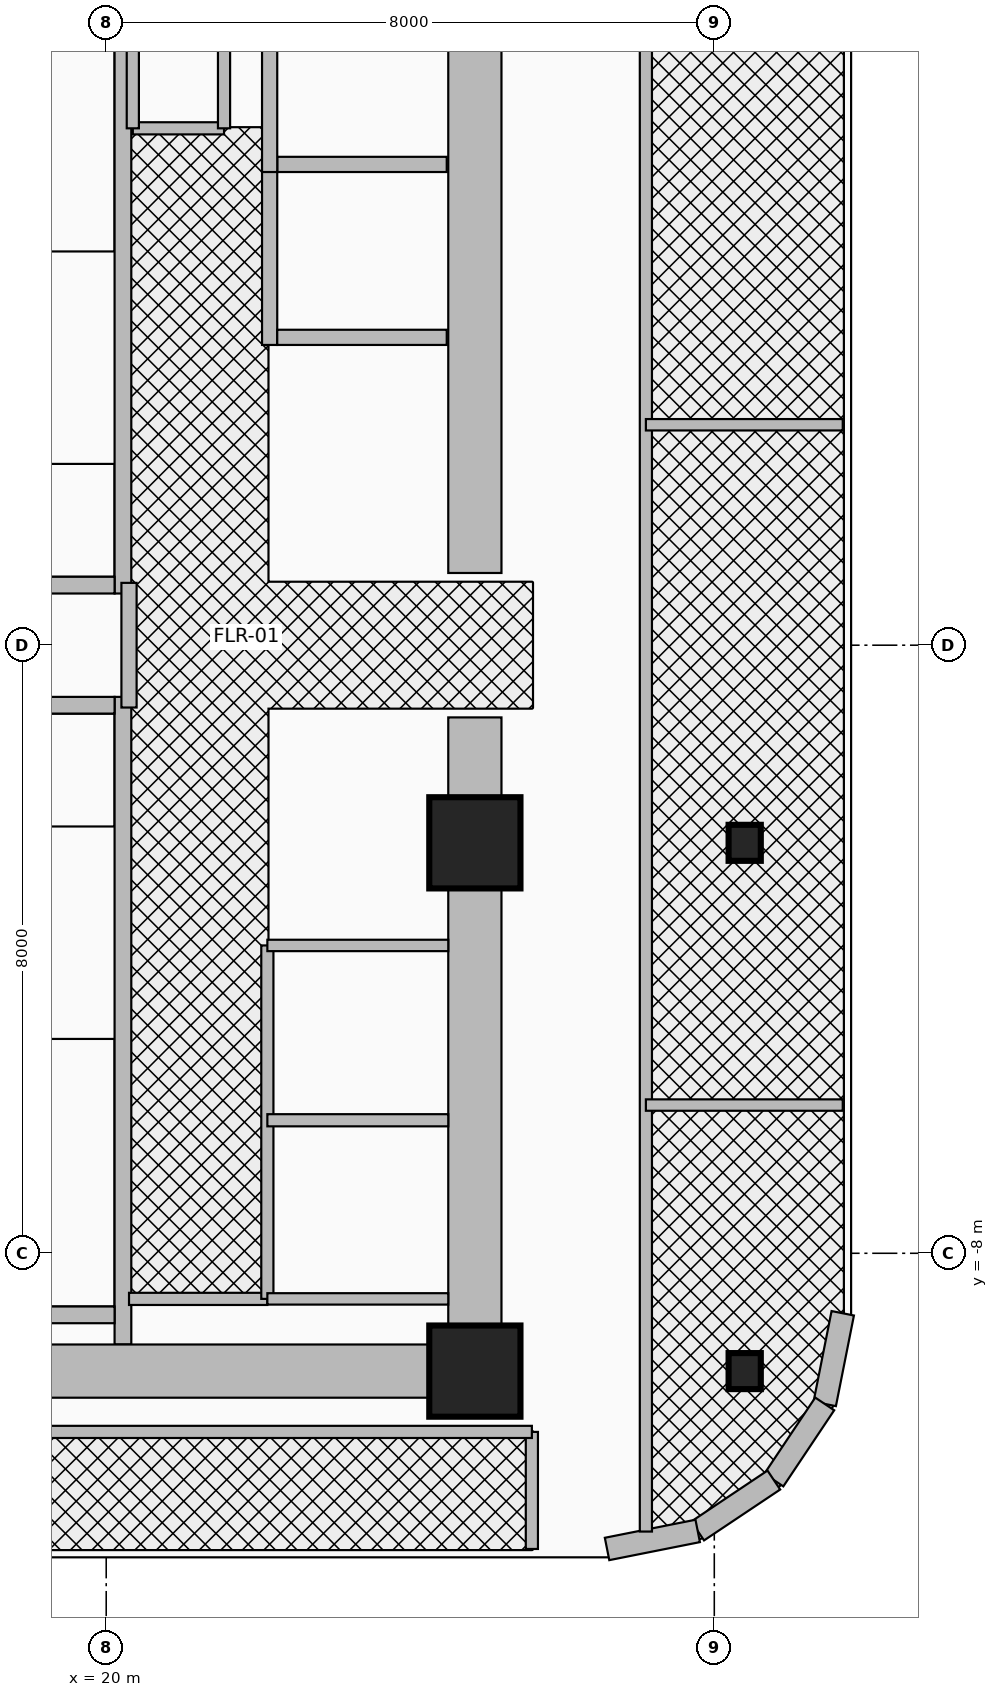
"""IFC4 building model, lengths in metres.
Left out: names, types, materials, properties, quantities, classifications, styles, units other than length and angle.
Written with IfcOpenShell. Run it as: python <this file> out.ifc"""

import sys

from ifc_helpers import new_model, si_unit, direction, frame, frame_2d, origin, origin_2d, place, context, subcontext, project, spatial, rectangle, i_section, extrude, source, transform, mapped, element, fill, save


model = new_model("IFC4")
c1 = context("Model", 3, precision=1e-05, world=origin(), true_north=direction((0.0, 1.0)))
c2 = subcontext(c1, "Body", "Model", "MODEL_VIEW")
j1 = project(units=[si_unit("LENGTHUNIT", "METRE"), si_unit("PLANEANGLEUNIT", "RADIAN")], contexts=[c1])
p1 = place(None, origin())
s1 = spatial("IfcSite", under=j1, at=p1, CompositionType="ELEMENT")
p2 = place(p1, origin())
s2 = spatial("IfcBuilding", under=s1, at=p2, CompositionType="ELEMENT")
p3 = place(p2, frame((0.0, 0.0, 131.6)))
s3 = spatial("IfcBuildingStorey", under=s2, at=p3, CompositionType="ELEMENT", Elevation=131.6)
p4 = place(p3, frame((20.22, 0.68, 0.0), z_axis=(0.0, 0.0, 1.0), x_axis=(0.0, 1.0, 0.0)))
e1 = element("IfcWall", 1, at=p4, inside=s3, PredefinedType="SHEAR", context=c2, shape_type="SweptSolid", body=[
    extrude(rectangle(XDim=8.52, YDim=0.22, at=frame_2d((4.26, 0.0))), origin(), (0.0, 0.0, 1.0), 3.46),
])
p5 = place(p3, frame((17.0, 0.79, 0.0), z_axis=(0.0, 0.0, 1.0), x_axis=(1.0, 0.0, 0.0)))
e2 = element("IfcWall", 2, at=p5, inside=s3, PredefinedType="SHEAR", context=c2, shape_type="SweptSolid", body=[
    extrude(rectangle(XDim=3.11, YDim=0.22, at=frame_2d((1.555, 0.0))), origin(), (0.0, 0.0, 1.0), 3.46),
])
p6 = place(p5, frame((0.95, 0.0, 0.0)))
e3 = element("IfcOpeningElement", 3, at=p6, cuts=e2, PredefinedType="OPENING", context=c2, shape_type="SweptSolid", body=[
    extrude(rectangle(XDim=1.1, YDim=2.15, at=frame_2d((0.55, 1.075))), frame((0.0, 0.125, 0.0), z_axis=(0.0, -1.0, 0.0), x_axis=(1.0, 0.0, 0.0)), (0.0, 0.0, 1.0), 0.25),
])
p7 = place(p3, frame((20.22, -9.2, 0.0), z_axis=(0.0, 0.0, 1.0), x_axis=(0.0, 1.0, 0.0)))
e4 = element("IfcWall", 4, at=p7, inside=s3, PredefinedType="SHEAR", context=c2, shape_type="SweptSolid", body=[
    extrude(rectangle(XDim=8.52, YDim=0.22, at=frame_2d((4.26, 0.0))), origin(), (0.0, 0.0, 1.0), 3.46),
])
p8 = place(p3, frame((17.0, -8.81, 0.0), z_axis=(0.0, 0.0, 1.0), x_axis=(1.0, 0.0, 0.0)))
e5 = element("IfcWall", 5, at=p8, inside=s3, PredefinedType="SHEAR", context=c2, shape_type="SweptSolid", body=[
    extrude(rectangle(XDim=3.11, YDim=0.22, at=frame_2d((1.555, 0.0))), origin(), (0.0, 0.0, 1.0), 3.46),
])
p9 = place(p3, frame((17.0, -0.79, 0.0), z_axis=(0.0, 0.0, 1.0), x_axis=(1.0, 0.0, 0.0)))
e6 = element("IfcWall", 6, at=p9, inside=s3, PredefinedType="SHEAR", context=c2, shape_type="SweptSolid", body=[
    extrude(rectangle(XDim=3.11, YDim=0.22, at=frame_2d((1.555, 0.0))), origin(), (0.0, 0.0, 1.0), 3.46),
])
p10 = place(p9, frame((0.95, 0.0, 0.0)))
e7 = element("IfcOpeningElement", 7, at=p10, cuts=e6, PredefinedType="OPENING", context=c2, shape_type="SweptSolid", body=[
    extrude(rectangle(XDim=1.1, YDim=2.15, at=frame_2d((0.55, 1.075))), frame((0.0, 0.125, 0.0), z_axis=(0.0, -1.0, 0.0), x_axis=(1.0, 0.0, 0.0)), (0.0, 0.0, 1.0), 0.25),
])
for number, where, z_axis, x_axis in (
    (8, (24.85, -9.9, 0.0), (0.0, 0.0, 1.0), (0.0, 1.0, 0.0)),
    (9, (24.85, 0.95, 0.0), (0.0, 0.0, 1.0), (0.0, 1.0, 0.0)),
):
    element("IfcWall", number, at=place(p3, frame(where, z_axis=z_axis, x_axis=x_axis)), inside=s3, PredefinedType="SHEAR", context=c2, shape_type="SweptSolid", body=[
        extrude(rectangle(XDim=8.95, YDim=0.7, at=frame_2d((4.475, 0.0))), origin(), (0.0, 0.0, 1.0), 3.46),
    ])
p11 = place(p3, frame((15.85, -9.55, 0.0), z_axis=(0.0, 0.0, 1.0), x_axis=(1.0, 0.0, 0.0)))
e10 = element("IfcWall", 10, at=p11, inside=s3, PredefinedType="SHEAR", context=c2, shape_type="SweptSolid", body=[
    extrude(rectangle(XDim=9.0, YDim=0.7, at=frame_2d((4.5, 0.0))), origin(), (0.0, 0.0, 1.0), 3.46),
])
m1 = source(origin(), c2, "Body", "SweptSolid", [
    extrude(rectangle(XDim=1.2, YDim=1.2, at=origin_2d()), origin(), (0.0, 0.0, 1.0), 3.7),
])
p12 = place(p3, frame((24.85, -9.55, 0.0), z_axis=(0.0, 0.0, 1.0), x_axis=(1.0, 0.0, 0.0)))
e11 = element("IfcColumn", 11, at=p12, inside=s3, PredefinedType="COLUMN", context=c2, shape_type="MappedRepresentation", body=[
    mapped(m1, transform((0.0, 0.0, 0.0), x_axis=(1.0, 0.0, 0.0), y_axis=(0.0, 1.0, 0.0), z_axis=(0.0, 0.0, 1.0), scale=1.0)),
])
m2 = source(origin(), c2, "Body", "SweptSolid", [
    extrude(i_section(OverallWidth=0.424, OverallDepth=0.474, WebThickness=0.048, FlangeThickness=0.077, at=origin_2d()), origin(), (0.0, 0.0, 1.0), 3.7),
])
p13 = place(p3, frame((28.4, -9.55, 0.0), z_axis=(0.0, 0.0, 1.0), x_axis=(1.0, 0.0, 0.0)))
e12 = element("IfcColumn", 12, at=p13, inside=s3, PredefinedType="COLUMN", context=c2, shape_type="MappedRepresentation", body=[
    mapped(m2, transform((0.0, 0.0, 0.0), x_axis=(1.0, 0.0, 0.0), y_axis=(0.0, 1.0, 0.0), z_axis=(0.0, 0.0, 1.0), scale=1.0)),
])
p14 = place(p3, frame((24.85, -2.6, 0.0), z_axis=(0.0, 0.0, 1.0), x_axis=(1.0, 0.0, 0.0)))
e13 = element("IfcColumn", 13, at=p14, inside=s3, PredefinedType="COLUMN", context=c2, shape_type="MappedRepresentation", body=[
    mapped(m1, transform((0.0, 0.0, 0.0), x_axis=(1.0, 0.0, 0.0), y_axis=(0.0, 1.0, 0.0), z_axis=(0.0, 0.0, 1.0), scale=1.0)),
])
p15 = place(p3, frame((28.4, -2.6, 0.0), z_axis=(0.0, 0.0, 1.0), x_axis=(1.0, 0.0, 0.0)))
e14 = element("IfcColumn", 14, at=p15, inside=s3, PredefinedType="COLUMN", context=c2, shape_type="MappedRepresentation", body=[
    mapped(m2, transform((0.0, 0.0, 0.0), x_axis=(1.0, 0.0, 0.0), y_axis=(0.0, 1.0, 0.0), z_axis=(0.0, 0.0, 1.0), scale=1.0)),
])
p16 = place(p3, frame((29.69, -8.789, 0.0), z_axis=(0.0, 0.0, 1.0), x_axis=(-0.194996050505, -0.980804027463, 0.0)))
e15 = element("IfcWall", 15, at=p16, inside=s3, PredefinedType="SOLIDWALL", context=c2, shape_type="SweptSolid", body=[
    extrude(rectangle(XDim=1.216, YDim=0.3, at=frame_2d((0.608, 0.0))), origin(), (0.0, 0.0, 1.0), 3.46),
])
for number, where, z_axis, x_axis in (
    (16, (29.453, -9.982, 0.0), (0.0, 0.0, 1.0), (-0.556, -0.831, 0.0)),
    (17, (28.783, -10.983, 0.0), (0.0, 0.0, 1.0), (-0.831, -0.556, 0.0)),
):
    element("IfcWall", number, at=place(p3, frame(where, z_axis=z_axis, x_axis=x_axis)), inside=s3, PredefinedType="SOLIDWALL", context=c2, shape_type="SweptSolid", body=[
        extrude(rectangle(XDim=1.205, YDim=0.3, at=frame_2d((0.603, 0.0))), origin(), (0.0, 0.0, 1.0), 3.46),
    ])
p17 = place(p3, frame((27.782, -11.653, 0.0), z_axis=(0.0, 0.0, 1.0), x_axis=(-0.980811661072, -0.194957650543, 0.0)))
e18 = element("IfcWall", 18, at=p17, inside=s3, PredefinedType="SOLIDWALL", context=c2, shape_type="SweptSolid", body=[
    extrude(rectangle(XDim=1.216, YDim=0.3, at=frame_2d((0.608, 0.0))), origin(), (0.0, 0.0, 1.0), 3.46),
])
p18 = place(p3, frame((22.15, 3.95, 0.0), z_axis=(0.0, 0.0, 1.0), x_axis=(0.0, 1.0, 0.0)))
e19 = element("IfcWall", 19, at=p18, inside=s3, PredefinedType="MOVABLE", context=c2, shape_type="SweptSolid", body=[
    extrude(rectangle(XDim=2.475, YDim=0.2, at=frame_2d((1.238, 0.0))), origin(), (0.0, 0.0, 1.0), 3.46),
])
p19 = place(p18, frame((0.688, 0.0, 0.0)))
e20 = element("IfcOpeningElement", 20, at=p19, cuts=e19, PredefinedType="OPENING", context=c2, shape_type="SweptSolid", body=[
    extrude(rectangle(XDim=1.1, YDim=2.1, at=frame_2d((0.55, 1.05))), frame((0.0, 0.115, 0.0), z_axis=(0.0, -1.0, 0.0), x_axis=(1.0, 0.0, 0.0)), (0.0, 0.0, 1.0), 0.23),
])
for number, where, z_axis, x_axis in (
    (21, (22.25, 4.05, 0.0), (0.0, 0.0, 1.0), (1.0, 0.0, 0.0)),
    (22, (22.25, 6.325, 0.0), (0.0, 0.0, 1.0), (1.0, 0.0, 0.0)),
):
    element("IfcWall", number, at=place(p3, frame(where, z_axis=z_axis, x_axis=x_axis)), inside=s3, PredefinedType="MOVABLE", context=c2, shape_type="SweptSolid", body=[
        extrude(rectangle(XDim=2.23, YDim=0.2, at=frame_2d((1.115, 0.0))), origin(), (0.0, 0.0, 1.0), 2.245),
    ])
p20 = place(p3, frame((22.15, 6.225, 0.0), z_axis=(0.0, 0.0, 1.0), x_axis=(0.0, 1.0, 0.0)))
e23 = element("IfcWall", 23, at=p20, inside=s3, PredefinedType="MOVABLE", context=c2, shape_type="SweptSolid", body=[
    extrude(rectangle(XDim=2.475, YDim=0.2, at=frame_2d((1.237, 0.0))), origin(), (0.0, 0.0, 1.0), 3.46),
])
p21 = place(p20, frame((0.688, 0.0, 0.0)))
e24 = element("IfcOpeningElement", 24, at=p21, cuts=e23, PredefinedType="OPENING", context=c2, shape_type="SweptSolid", body=[
    extrude(rectangle(XDim=1.1, YDim=2.1, at=frame_2d((0.55, 1.05))), frame((0.0, 0.115, 0.0), z_axis=(0.0, -1.0, 0.0), x_axis=(1.0, 0.0, 0.0)), (0.0, 0.0, 1.0), 0.23),
])
p22 = place(p3, frame((20.3, -0.82, 0.0), z_axis=(0.0, 0.0, 1.0), x_axis=(0.0, 1.0, 0.0)))
e25 = element("IfcWall", 25, at=p22, inside=s3, PredefinedType="PARTITIONING", context=c2, shape_type="SweptSolid", body=[
    extrude(rectangle(XDim=1.64, YDim=0.2, at=frame_2d((0.82, 0.0))), origin(), (0.0, 0.0, 1.0), 3.46),
])
p23 = place(p22, frame((0.295, 0.0, 0.0)))
e26 = element("IfcOpeningElement", 26, at=p23, cuts=e25, PredefinedType="OPENING", context=c2, shape_type="SweptSolid", body=[
    extrude(rectangle(XDim=1.05, YDim=2.15, at=frame_2d((0.525, 1.075))), frame((0.0, 0.115, 0.0), z_axis=(0.0, -1.0, 0.0), x_axis=(1.0, 0.0, 0.0)), (0.0, 0.0, 1.0), 0.23),
])
p24 = place(p3, frame((20.35, 6.8, 0.0), z_axis=(0.0, 0.0, 1.0), x_axis=(1.0, 0.0, 0.0)))
e27 = element("IfcWall", 27, at=p24, inside=s3, PredefinedType="PARTITIONING", context=c2, shape_type="SweptSolid", body=[
    extrude(rectangle(XDim=1.2, YDim=0.16, at=frame_2d((0.6, 0.0))), origin(), (0.0, 0.0, 1.0), 3.46),
])
p25 = place(p24, frame((0.175, 0.0, 0.0)))
e28 = element("IfcOpeningElement", 28, at=p25, cuts=e27, PredefinedType="OPENING", context=c2, shape_type="SweptSolid", body=[
    extrude(rectangle(XDim=0.85, YDim=2.05, at=frame_2d((0.425, 1.025))), frame((0.0, 0.095, 0.0), z_axis=(0.0, -1.0, 0.0), x_axis=(1.0, 0.0, 0.0)), (0.0, 0.0, 1.0), 0.19),
])
for number, where, z_axis, x_axis in (
    (29, (21.55, 6.8, 0.0), (0.0, 0.0, 1.0), (0.0, 1.0, 0.0)),
    (30, (20.35, 6.8, 0.0), (0.0, 0.0, 1.0), (0.0, 1.0, 0.0)),
):
    element("IfcWall", number, at=place(p3, frame(where, z_axis=z_axis, x_axis=x_axis)), inside=s3, PredefinedType="PARTITIONING", context=c2, shape_type="SweptSolid", body=[
        extrude(rectangle(XDim=1.8, YDim=0.16, at=frame_2d((0.9, 0.0))), origin(), (0.0, 0.0, 1.0), 3.46),
    ])
p26 = place(p3, frame((20.3, -8.6, 0.0), z_axis=(0.0, 0.0, 1.0), x_axis=(1.0, 0.0, 0.0)))
e31 = element("IfcWall", 31, at=p26, inside=s3, PredefinedType="PARTITIONING", context=c2, shape_type="SweptSolid", body=[
    extrude(rectangle(XDim=1.82, YDim=0.16, at=frame_2d((0.91, 0.0))), origin(), (0.0, 0.0, 1.0), 3.46),
])
p27 = place(p3, frame((22.12, -8.6, 0.0), z_axis=(0.0, 0.0, 1.0), x_axis=(0.0, 1.0, 0.0)))
e32 = element("IfcWall", 32, at=p27, inside=s3, PredefinedType="PARTITIONING", context=c2, shape_type="SweptSolid", body=[
    extrude(rectangle(XDim=4.65, YDim=0.16, at=frame_2d((2.325, 0.0))), origin(), (0.0, 0.0, 1.0), 3.46),
])
p28 = place(p27, frame((0.7, 0.0, 0.0)))
e33 = element("IfcOpeningElement", 33, at=p28, cuts=e32, PredefinedType="OPENING", context=c2, shape_type="SweptSolid", body=[
    extrude(rectangle(XDim=0.85, YDim=2.05, at=frame_2d((0.425, 1.025))), frame((0.0, 0.095, 0.0), z_axis=(0.0, -1.0, 0.0), x_axis=(1.0, 0.0, 0.0)), (0.0, 0.0, 1.0), 0.19),
])
p29 = place(p27, frame((3.0, 0.0, 0.0)))
e34 = element("IfcOpeningElement", 34, at=p29, cuts=e32, PredefinedType="OPENING", context=c2, shape_type="SweptSolid", body=[
    extrude(rectangle(XDim=0.85, YDim=2.05, at=frame_2d((0.425, 1.025))), frame((0.0, 0.095, 0.0), z_axis=(0.0, -1.0, 0.0), x_axis=(1.0, 0.0, 0.0)), (0.0, 0.0, 1.0), 0.19),
])
for number, where, z_axis, x_axis in (
    (35, (22.12, -3.95, 0.0), (0.0, 0.0, 1.0), (1.0, 0.0, 0.0)),
    (36, (22.12, -8.6, 0.0), (0.0, 0.0, 1.0), (1.0, 0.0, 0.0)),
):
    element("IfcWall", number, at=place(p3, frame(where, z_axis=z_axis, x_axis=x_axis)), inside=s3, PredefinedType="PARTITIONING", context=c2, shape_type="SweptSolid", body=[
        extrude(rectangle(XDim=2.38, YDim=0.15, at=frame_2d((1.19, 0.0))), origin(), (0.0, 0.0, 1.0), 3.46),
    ])
p30 = place(p3, frame((22.12, -6.25, 0.0), z_axis=(0.0, 0.0, 1.0), x_axis=(1.0, 0.0, 0.0)))
e37 = element("IfcWall", 37, at=p30, inside=s3, PredefinedType="PARTITIONING", context=c2, shape_type="SweptSolid", body=[
    extrude(rectangle(XDim=2.38, YDim=0.16, at=frame_2d((1.19, 0.0))), origin(), (0.0, 0.0, 1.0), 3.46),
])
p31 = place(p3, frame((25.6, -11.89, 0.0), z_axis=(0.0, 0.0, 1.0), x_axis=(0.0, 1.0, 0.0)))
e38 = element("IfcWall", 38, at=p31, inside=s3, PredefinedType="PARTITIONING", context=c2, shape_type="SweptSolid", body=[
    extrude(rectangle(XDim=1.54, YDim=0.16, at=frame_2d((0.77, 0.0))), origin(), (0.0, 0.0, 1.0), 3.46),
])
p32 = place(p31, frame((0.32, 0.0, 0.0)))
e39 = element("IfcOpeningElement", 39, at=p32, cuts=e38, PredefinedType="OPENING", context=c2, shape_type="SweptSolid", body=[
    extrude(rectangle(XDim=0.9, YDim=2.1, at=frame_2d((0.45, 1.05))), frame((0.0, 0.095, 0.0), z_axis=(0.0, -1.0, 0.0), x_axis=(1.0, 0.0, 0.0)), (0.0, 0.0, 1.0), 0.19),
])
p33 = place(p3, frame((14.044, -10.35, 0.0), z_axis=(0.0, 0.0, 1.0), x_axis=(1.0, 0.0, 0.0)))
e40 = element("IfcWall", 40, at=p33, inside=s3, PredefinedType="PARTITIONING", context=c2, shape_type="SweptSolid", body=[
    extrude(rectangle(XDim=11.556, YDim=0.16, at=frame_2d((5.778, 0.0))), origin(), (0.0, 0.0, 1.0), 3.46),
])
p34 = place(p3, frame((27.1, -11.661, 0.0), z_axis=(0.0, 0.0, 1.0), x_axis=(0.0, 1.0, 0.0)))
e41 = element("IfcWall", 41, at=p34, inside=s3, PredefinedType="PARTITIONING", context=c2, shape_type="SweptSolid", body=[
    extrude(rectangle(XDim=23.511, YDim=0.16, at=frame_2d((11.755, 0.0))), origin(), (0.0, 0.0, 1.0), 2.666),
])
p35 = place(p34, frame((2.56, 0.0, 0.0)))
e42 = element("IfcOpeningElement", 42, at=p35, cuts=e41, PredefinedType="OPENING", context=c2, shape_type="SweptSolid", body=[
    extrude(rectangle(XDim=0.9, YDim=2.1, at=frame_2d((0.45, 1.05))), frame((0.0, 0.095, 0.0), z_axis=(0.0, -1.0, 0.0), x_axis=(1.0, 0.0, 0.0)), (0.0, 0.0, 1.0), 0.19),
])
p36 = place(p34, frame((9.451, 0.0, 0.0)))
e43 = element("IfcOpeningElement", 43, at=p36, cuts=e41, PredefinedType="OPENING", context=c2, shape_type="SweptSolid", body=[
    extrude(rectangle(XDim=1.8, YDim=2.15, at=frame_2d((0.9, 1.075))), frame((0.0, 0.095, 0.0), z_axis=(0.0, -1.0, 0.0), x_axis=(1.0, 0.0, 0.0)), (0.0, 0.0, 1.0), 0.19),
])
p37 = place(p34, frame((18.136, 0.0, 0.0)))
e44 = element("IfcOpeningElement", 44, at=p37, cuts=e41, PredefinedType="OPENING", context=c2, shape_type="SweptSolid", body=[
    extrude(rectangle(XDim=1.8, YDim=2.15, at=frame_2d((0.9, 1.075))), frame((0.0, 0.095, 0.0), z_axis=(0.0, -1.0, 0.0), x_axis=(1.0, 0.0, 0.0)), (0.0, 0.0, 1.0), 0.19),
])
for number, where, z_axis, x_axis in (
    (45, (27.1, -6.05, 0.0), (0.0, 0.0, 1.0), (1.0, 0.0, 0.0)),
    (46, (27.1, 2.9, 0.0), (0.0, 0.0, 1.0), (1.0, 0.0, 0.0)),
):
    element("IfcWall", number, at=place(p3, frame(where, z_axis=z_axis, x_axis=x_axis)), inside=s3, PredefinedType="PARTITIONING", context=c2, shape_type="SweptSolid", body=[
        extrude(rectangle(XDim=2.59, YDim=0.15, at=frame_2d((1.295, 0.0))), origin(), (0.0, 0.0, 1.0), 2.896),
    ])
p38 = place(p19, origin())
e47 = element("IfcDoor", 47, at=p38, inside=s3, OperationType="DOUBLE_DOOR_SLIDING", PredefinedType="DOOR", context=c2, shape_type="SweptSolid", body=[
    extrude(rectangle(XDim=1.1, YDim=2.1, at=frame_2d((0.55, 1.05))), frame((0.0, 0.025, 0.0), z_axis=(0.0, -1.0, 0.0), x_axis=(1.0, 0.0, 0.0)), (0.0, 0.0, 1.0), 0.05),
])
fill(e20, e47)
p39 = place(p21, origin())
e48 = element("IfcDoor", 48, at=p39, inside=s3, OperationType="DOUBLE_DOOR_SLIDING", PredefinedType="DOOR", context=c2, shape_type="SweptSolid", body=[
    extrude(rectangle(XDim=1.1, YDim=2.1, at=frame_2d((0.55, 1.05))), frame((0.0, 0.025, 0.0), z_axis=(0.0, -1.0, 0.0), x_axis=(1.0, 0.0, 0.0)), (0.0, 0.0, 1.0), 0.05),
])
fill(e24, e48)
p40 = place(p23, frame((1.05, 0.0, 0.0), z_axis=(0.0, 0.0, 1.0), x_axis=(-1.0, 0.0, 0.0)))
e49 = element("IfcDoor", 49, at=p40, inside=s3, OperationType="SINGLE_SWING_LEFT", PredefinedType="DOOR", context=c2, shape_type="SweptSolid", body=[
    extrude(rectangle(XDim=1.05, YDim=2.15, at=frame_2d((0.525, 1.075))), frame((0.0, 0.025, 0.0), z_axis=(0.0, -1.0, 0.0), x_axis=(1.0, 0.0, 0.0)), (0.0, 0.0, 1.0), 0.05),
])
fill(e26, e49)
p41 = place(p25, origin())
e50 = element("IfcDoor", 50, at=p41, inside=s3, OperationType="SINGLE_SWING_RIGHT", PredefinedType="DOOR", context=c2, shape_type="SweptSolid", body=[
    extrude(rectangle(XDim=0.85, YDim=2.05, at=frame_2d((0.425, 1.025))), frame((0.0, 0.025, 0.0), z_axis=(0.0, -1.0, 0.0), x_axis=(1.0, 0.0, 0.0)), (0.0, 0.0, 1.0), 0.05),
])
fill(e28, e50)
p42 = place(p28, origin())
e51 = element("IfcDoor", 51, at=p42, inside=s3, OperationType="SINGLE_SWING_LEFT", PredefinedType="DOOR", context=c2, shape_type="SweptSolid", body=[
    extrude(rectangle(XDim=0.85, YDim=2.05, at=frame_2d((0.425, 1.025))), frame((0.0, 0.025, 0.0), z_axis=(0.0, -1.0, 0.0), x_axis=(1.0, 0.0, 0.0)), (0.0, 0.0, 1.0), 0.05),
])
fill(e33, e51)
p43 = place(p29, origin())
e52 = element("IfcDoor", 52, at=p43, inside=s3, OperationType="SINGLE_SWING_RIGHT", PredefinedType="DOOR", context=c2, shape_type="SweptSolid", body=[
    extrude(rectangle(XDim=0.85, YDim=2.05, at=frame_2d((0.425, 1.025))), frame((0.0, 0.025, 0.0), z_axis=(0.0, -1.0, 0.0), x_axis=(1.0, 0.0, 0.0)), (0.0, 0.0, 1.0), 0.05),
])
fill(e34, e52)
p44 = place(p32, frame((0.9, 0.0, 0.0), z_axis=(0.0, 0.0, 1.0), x_axis=(-1.0, 0.0, 0.0)))
e53 = element("IfcDoor", 53, at=p44, inside=s3, OperationType="SINGLE_SWING_LEFT", PredefinedType="DOOR", context=c2, shape_type="SweptSolid", body=[
    extrude(rectangle(XDim=0.9, YDim=2.1, at=frame_2d((0.45, 1.05))), frame((0.0, 0.025, 0.0), z_axis=(0.0, -1.0, 0.0), x_axis=(1.0, 0.0, 0.0)), (0.0, 0.0, 1.0), 0.05),
])
fill(e39, e53)
p45 = place(p35, frame((0.9, 0.0, 0.0), z_axis=(0.0, 0.0, 1.0), x_axis=(-1.0, 0.0, 0.0)))
e54 = element("IfcDoor", 54, at=p45, inside=s3, OperationType="SINGLE_SWING_LEFT", PredefinedType="DOOR", context=c2, shape_type="SweptSolid", body=[
    extrude(rectangle(XDim=0.9, YDim=2.1, at=frame_2d((0.45, 1.05))), frame((0.0, 0.025, 0.0), z_axis=(0.0, -1.0, 0.0), x_axis=(1.0, 0.0, 0.0)), (0.0, 0.0, 1.0), 0.05),
])
fill(e42, e54)
p46 = place(p36, origin())
e55 = element("IfcDoor", 55, at=p46, inside=s3, OperationType="DOUBLE_DOOR_SINGLE_SWING", PredefinedType="DOOR", context=c2, shape_type="SweptSolid", body=[
    extrude(rectangle(XDim=1.8, YDim=2.15, at=frame_2d((0.9, 1.075))), frame((0.0, 0.025, 0.0), z_axis=(0.0, -1.0, 0.0), x_axis=(1.0, 0.0, 0.0)), (0.0, 0.0, 1.0), 0.05),
])
fill(e43, e55)
p47 = place(p37, frame((1.8, 0.0, 0.0), z_axis=(0.0, 0.0, 1.0), x_axis=(-1.0, 0.0, 0.0)))
e56 = element("IfcDoor", 56, at=p47, inside=s3, OperationType="DOUBLE_DOOR_SINGLE_SWING", PredefinedType="DOOR", context=c2, shape_type="SweptSolid", body=[
    extrude(rectangle(XDim=1.8, YDim=2.15, at=frame_2d((0.9, 1.075))), frame((0.0, 0.025, 0.0), z_axis=(0.0, -1.0, 0.0), x_axis=(1.0, 0.0, 0.0)), (0.0, 0.0, 1.0), 0.05),
])
fill(e44, e56)
save(model, sys.argv[1])
